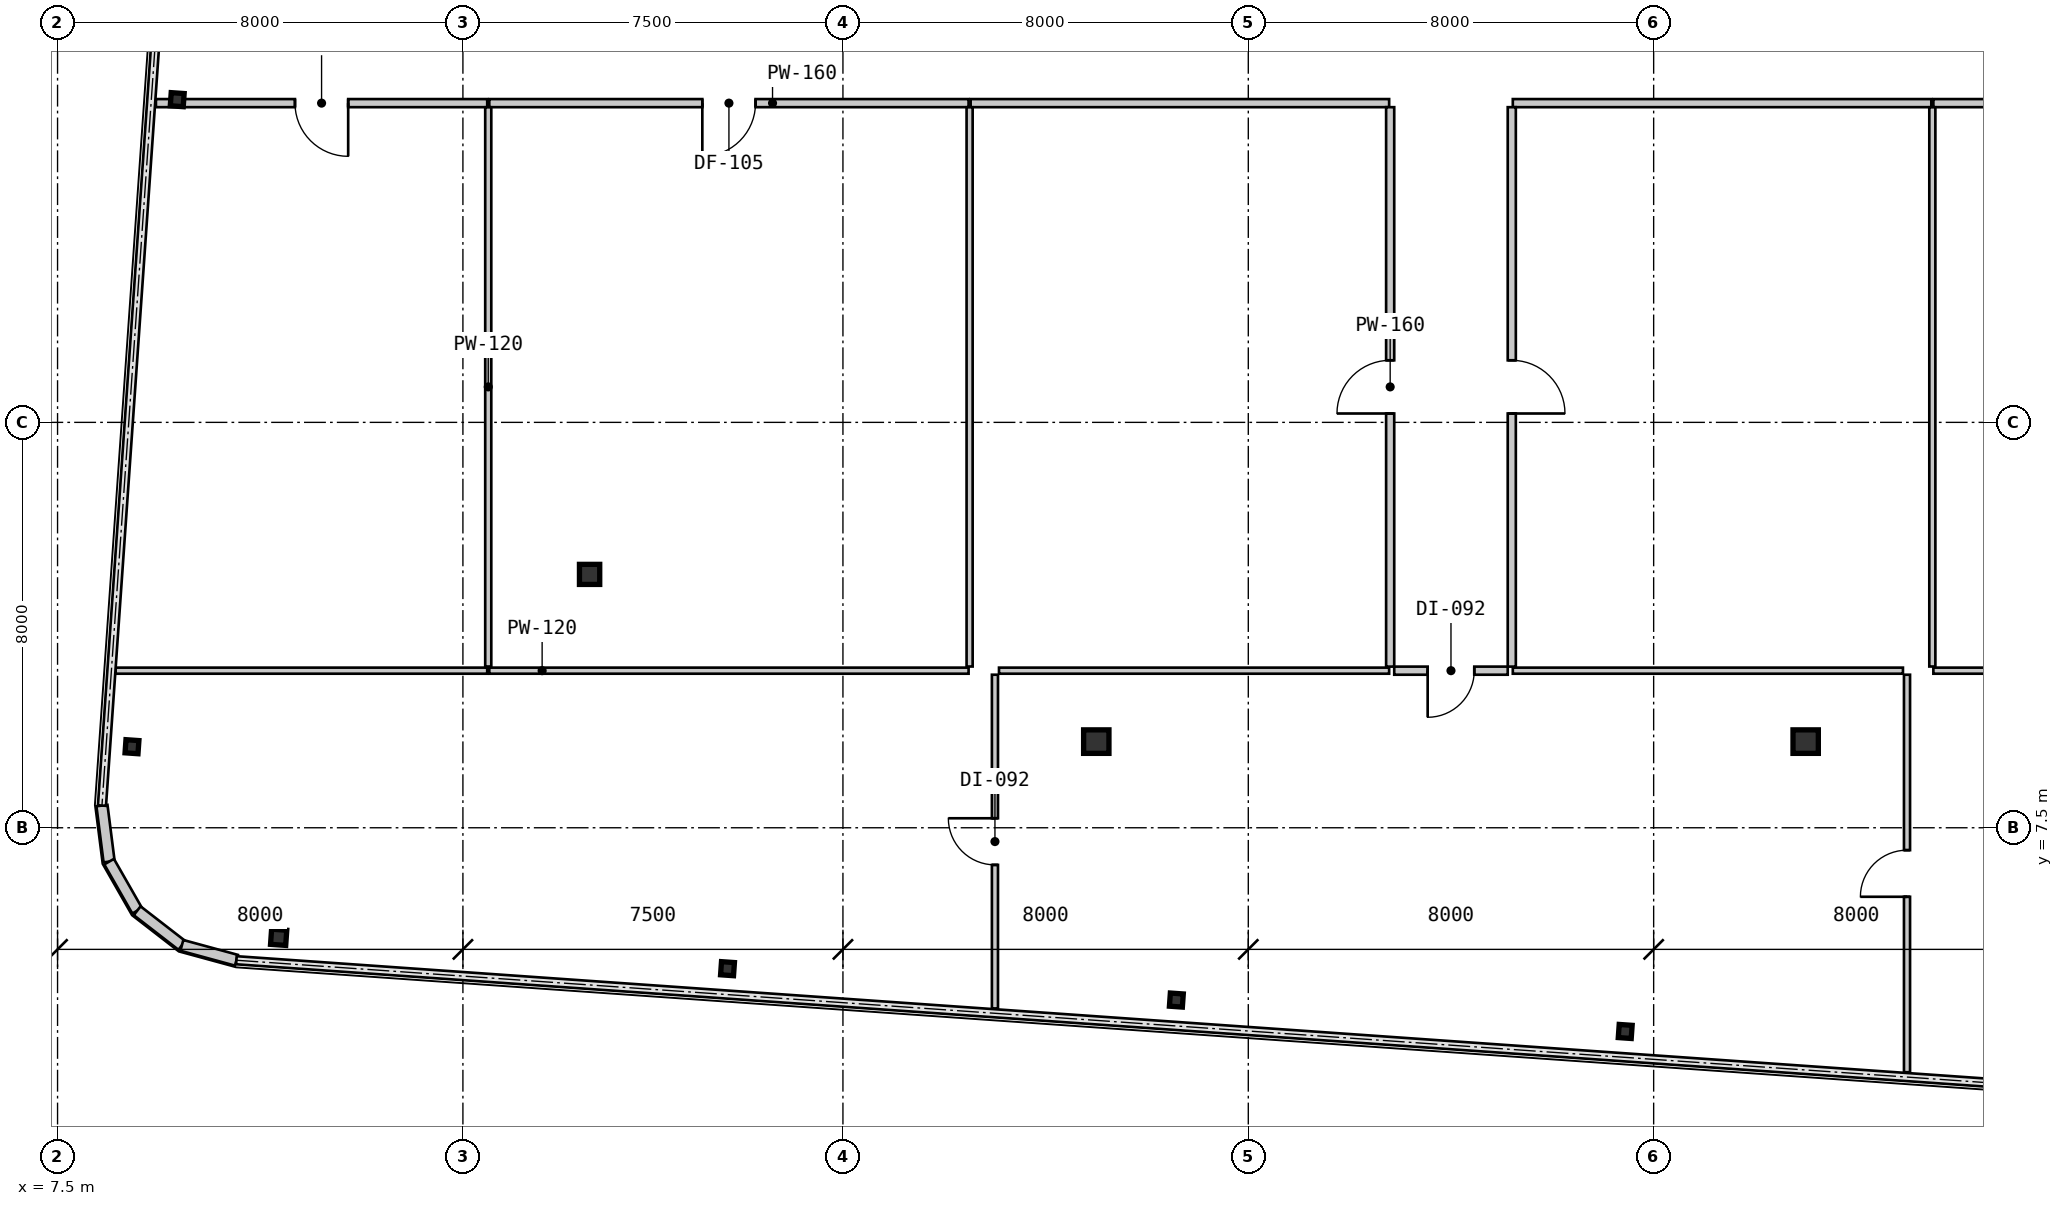
"""IFC4 building model, lengths in metres.
Left out: names, types, materials, properties, quantities, classifications, styles, units other than length and angle.
Written with IfcOpenShell. Run it as: python <this file> out.ifc"""

import sys

from ifc_helpers import new_model, si_unit, direction, frame, frame_2d, origin, origin_2d, place, context, subcontext, project, spatial, rectangle, hollow_rectangle, i_section, extrude, source, transform, mapped, element, fill, save


model = new_model("IFC4")
c1 = context("Model", 3, precision=1e-05, world=origin(), true_north=direction((0.0, 1.0)))
c2 = subcontext(c1, "Body", "Model", "MODEL_VIEW")
j1 = project(units=[si_unit("LENGTHUNIT", "METRE"), si_unit("PLANEANGLEUNIT", "RADIAN")], contexts=[c1])
p1 = place(None, origin())
s1 = spatial("IfcSite", under=j1, at=p1, CompositionType="ELEMENT")
p2 = place(p1, origin())
s2 = spatial("IfcBuilding", under=s1, at=p2, CompositionType="ELEMENT")
p3 = place(p2, frame((0.0, 0.0, 126.7)))
s3 = spatial("IfcBuildingStorey", under=s2, at=p3, CompositionType="ELEMENT", Elevation=126.7)
m1 = source(origin(), c2, "Body", "SweptSolid", [
    extrude(i_section(OverallWidth=0.5, OverallDepth=0.464, WebThickness=0.022, FlangeThickness=0.034, at=origin_2d()), origin(), (0.0, 0.0, 1.0), 3.15),
])
for number, where, z_axis, x_axis in (
    (1, (28.0, 9.2, 0.0), (0.0, 0.0, 1.0), (1.0, 0.0, 0.0)),
    (2, (42.0, 9.2, 0.0), (0.0, 0.0, 1.0), (1.0, 0.0, 0.0)),
):
    element("IfcColumn", number, at=place(p3, frame(where, z_axis=z_axis, x_axis=x_axis)), inside=s3, PredefinedType="COLUMN", context=c2, shape_type="MappedRepresentation", body=[
        mapped(m1, transform((0.0, 0.0, 0.0), scale=1.0)),
    ])
m2 = source(origin(), c2, "Body", "SweptSolid", [
    extrude(i_section(OverallWidth=0.4, OverallDepth=0.396, WebThickness=0.022, FlangeThickness=0.034, at=origin_2d()), origin(), (0.0, 0.0, 1.0), 3.15),
])
p4 = place(p3, frame((18.0, 12.5, 0.0), z_axis=(0.0, 0.0, 1.0), x_axis=(1.0, 0.0, 0.0)))
e3 = element("IfcColumn", 3, at=p4, inside=s3, PredefinedType="COLUMN", context=c2, shape_type="MappedRepresentation", body=[
    mapped(m2, transform((0.0, 0.0, 0.0), scale=1.0)),
])
m3 = source(origin(), c2, "Body", "SweptSolid", [
    extrude(hollow_rectangle(XDim=0.3, YDim=0.3, WallThickness=0.012, at=origin_2d()), origin(), (0.0, 0.0, 1.0), 3.15),
])
p5 = place(p3, frame((11.864, 5.338, 0.0), z_axis=(0.0, 0.0, 1.0), x_axis=(0.99756405026, -0.069756473744, 0.0)))
e4 = element("IfcColumn", 4, at=p5, inside=s3, PredefinedType="COLUMN", context=c2, shape_type="MappedRepresentation", body=[
    mapped(m3, transform((0.0, 0.0, 0.0), scale=1.0)),
])
m4 = source(origin(), c2, "Body", "SweptSolid", [
    extrude(i_section(OverallWidth=0.256, OverallDepth=0.26, WebThickness=0.01, FlangeThickness=0.017, at=origin_2d()), origin(), (0.0, 0.0, 1.0), 3.15),
])
for number, where, z_axis, x_axis in (
    (5, (20.722, 4.719, 0.0), (0.0, 0.0, 1.0), (0.998, -0.07, 0.0)),
    (6, (29.58, 4.1, 0.0), (0.0, 0.0, 1.0), (0.998, -0.07, 0.0)),
    (7, (38.439, 3.48, 0.0), (0.0, 0.0, 1.0), (0.998, -0.07, 0.0)),
    (8, (8.969, 9.1, 0.0), (0.0, 0.0, 1.0), (0.998, -0.07, 0.0)),
    (9, (9.862, 21.868, 0.0), (0.0, 0.0, 1.0), (0.998, -0.07, 0.0)),
):
    element("IfcColumn", number, at=place(p3, frame(where, z_axis=z_axis, x_axis=x_axis)), inside=s3, PredefinedType="COLUMN", context=c2, shape_type="MappedRepresentation", body=[
        mapped(m4, transform((0.0, 0.0, 0.0), scale=1.0)),
    ])
m5 = source(origin(), c2, "Body", "SweptSolid", [
    extrude(rectangle(XDim=1.116, YDim=0.22, at=frame_2d((0.558, 0.0))), origin(), (0.0, 0.0, 1.0), 2.93),
])
for number, where, z_axis, x_axis in (
    (10, (8.376, 7.938, 0.0), (0.0, 0.0, 1.0), (0.126, -0.992, 0.0)),
    (11, (8.517, 6.831, 0.0), (0.0, 0.0, 1.0), (0.496, -0.868, 0.0)),
    (12, (9.071, 5.862, 0.0), (0.0, 0.0, 1.0), (0.791, -0.612, 0.0)),
    (13, (9.953, 5.179, 0.0), (0.0, 0.0, 1.0), (0.965, -0.263, 0.0)),
):
    element("IfcWall", number, at=place(p3, frame(where, z_axis=z_axis, x_axis=x_axis)), inside=s3, PredefinedType="SOLIDWALL", context=c2, shape_type="MappedRepresentation", body=[
        mapped(m5, transform((0.0, 0.0, 0.0), scale=1.0)),
    ])
m6 = source(origin(), c2, "Body", "SweptSolid", [
    extrude(rectangle(XDim=6.538, YDim=0.16, at=frame_2d((3.269, 0.0))), origin(), (0.0, 0.0, 1.0), 2.93),
])
p6 = place(p3, frame((15.98, 21.8, 0.0), z_axis=(0.0, 0.0, 1.0), x_axis=(-1.0, 0.0, 0.0)))
e14 = element("IfcWall", 14, at=p6, inside=s3, PredefinedType="PARTITIONING", context=c2, shape_type="MappedRepresentation", body=[
    mapped(m6, transform((0.0, 0.0, 0.0), scale=1.0)),
])
m7 = source(origin(), c2, "Body", "SweptSolid", [
    extrude(rectangle(XDim=1.05, YDim=2.1, at=frame_2d((0.525, 1.05))), frame((0.0, 0.09, 0.0), z_axis=(0.0, -1.0, 0.0), x_axis=(1.0, 0.0, 0.0)), (0.0, 0.0, 1.0), 0.18),
])
p7 = place(p6, frame((2.744, 0.0, 0.0)))
e15 = element("IfcOpeningElement", 15, at=p7, cuts=e14, PredefinedType="OPENING", context=c2, shape_type="MappedRepresentation", body=[
    mapped(m7, transform((0.0, 0.0, 0.0), scale=1.0)),
])
m8 = source(origin(), c2, "Body", "SweptSolid", [
    extrude(rectangle(XDim=9.459, YDim=0.16, at=frame_2d((4.73, 0.0))), origin(), (0.0, 0.0, 1.0), 2.93),
])
p8 = place(p3, frame((25.48, 21.8, 0.0), z_axis=(0.0, 0.0, 1.0), x_axis=(-1.0, 0.0, 0.0)))
e16 = element("IfcWall", 16, at=p8, inside=s3, PredefinedType="PARTITIONING", context=c2, shape_type="MappedRepresentation", body=[
    mapped(m8, transform((0.0, 0.0, 0.0), scale=1.0)),
])
p9 = place(p8, frame((4.205, 0.0, 0.0)))
e17 = element("IfcOpeningElement", 17, at=p9, cuts=e16, PredefinedType="OPENING", context=c2, shape_type="MappedRepresentation", body=[
    mapped(m7, transform((0.0, 0.0, 0.0), scale=1.0)),
])
m9 = source(origin(), c2, "Body", "SweptSolid", [
    extrude(rectangle(XDim=8.26, YDim=0.16, at=frame_2d((4.13, 0.0))), origin(), (0.0, 0.0, 1.0), 2.93),
])
for number, where, z_axis, x_axis in (
    (18, (33.78, 21.8, 0.0), (0.0, 0.0, 1.0), (-1.0, 0.0, 0.0)),
    (19, (44.48, 21.8, 0.0), (0.0, 0.0, 1.0), (-1.0, 0.0, 0.0)),
):
    element("IfcWall", number, at=place(p3, frame(where, z_axis=z_axis, x_axis=x_axis)), inside=s3, PredefinedType="PARTITIONING", context=c2, shape_type="MappedRepresentation", body=[
        mapped(m9, transform((0.0, 0.0, 0.0), scale=1.0)),
    ])
p10 = place(p3, frame((53.98, 21.8, 0.0), z_axis=(0.0, 0.0, 1.0), x_axis=(-1.0, 0.0, 0.0)))
e20 = element("IfcWall", 20, at=p10, inside=s3, PredefinedType="PARTITIONING", context=c2, shape_type="MappedRepresentation", body=[
    mapped(m8, transform((0.0, 0.0, 0.0), scale=1.0)),
])
p11 = place(p10, frame((4.205, 0.0, 0.0)))
e21 = element("IfcOpeningElement", 21, at=p11, cuts=e20, PredefinedType="OPENING", context=c2, shape_type="MappedRepresentation", body=[
    mapped(m7, transform((0.0, 0.0, 0.0), scale=1.0)),
])
m10 = source(origin(), c2, "Body", "SweptSolid", [
    extrude(rectangle(XDim=2.24, YDim=0.16, at=frame_2d((1.12, 0.0))), origin(), (0.0, 0.0, 1.0), 2.93),
])
p12 = place(p3, frame((36.12, 10.6, 0.0), z_axis=(0.0, 0.0, 1.0), x_axis=(-1.0, 0.0, 0.0)))
e22 = element("IfcWall", 22, at=p12, inside=s3, PredefinedType="PARTITIONING", context=c2, shape_type="MappedRepresentation", body=[
    mapped(m10, transform((0.0, 0.0, 0.0), scale=1.0)),
])
m11 = source(origin(), c2, "Body", "SweptSolid", [
    extrude(rectangle(XDim=0.92, YDim=2.1, at=frame_2d((0.46, 1.05))), frame((0.0, 0.09, 0.0), z_axis=(0.0, -1.0, 0.0), x_axis=(1.0, 0.0, 0.0)), (0.0, 0.0, 1.0), 0.18),
])
p13 = place(p12, frame((0.66, 0.0, 0.0)))
e23 = element("IfcOpeningElement", 23, at=p13, cuts=e22, PredefinedType="OPENING", context=c2, shape_type="MappedRepresentation", body=[
    mapped(m11, transform((0.0, 0.0, 0.0), scale=1.0)),
])
m12 = source(origin(), c2, "Body", "SweptSolid", [
    extrude(rectangle(XDim=11.04, YDim=0.16, at=frame_2d((5.52, 0.0))), origin(), (0.0, 0.0, 1.0), 2.93),
])
p14 = place(p3, frame((33.8, 10.68, 0.0), z_axis=(0.0, 0.0, 1.0), x_axis=(0.0, 1.0, 0.0)))
e24 = element("IfcWall", 24, at=p14, inside=s3, PredefinedType="PARTITIONING", context=c2, shape_type="MappedRepresentation", body=[
    mapped(m12, transform((0.0, 0.0, 0.0), scale=1.0)),
])
p15 = place(p14, frame((4.995, 0.0, 0.0)))
e25 = element("IfcOpeningElement", 25, at=p15, cuts=e24, PredefinedType="OPENING", context=c2, shape_type="MappedRepresentation", body=[
    mapped(m7, transform((0.0, 0.0, 0.0), scale=1.0)),
])
p16 = place(p3, frame((36.2, 21.72, 0.0), z_axis=(0.0, 0.0, 1.0), x_axis=(0.0, -1.0, 0.0)))
e26 = element("IfcWall", 26, at=p16, inside=s3, PredefinedType="PARTITIONING", context=c2, shape_type="MappedRepresentation", body=[
    mapped(m12, transform((0.0, 0.0, 0.0), scale=1.0)),
])
p17 = place(p16, frame((4.995, 0.0, 0.0)))
e27 = element("IfcOpeningElement", 27, at=p17, cuts=e26, PredefinedType="OPENING", context=c2, shape_type="MappedRepresentation", body=[
    mapped(m7, transform((0.0, 0.0, 0.0), scale=1.0)),
])
m13 = source(origin(), c2, "Body", "SweptSolid", [
    extrude(rectangle(XDim=6.585, YDim=0.12, at=frame_2d((3.293, 0.0))), origin(), (0.0, 0.0, 1.0), 2.93),
])
p18 = place(p3, frame((26.0, 10.52, 0.0), z_axis=(0.0, 0.0, 1.0), x_axis=(0.0, -1.0, 0.0)))
e28 = element("IfcWall", 28, at=p18, inside=s3, PredefinedType="PARTITIONING", context=c2, shape_type="MappedRepresentation", body=[
    mapped(m13, transform((0.0, 0.0, 0.0), scale=1.0)),
])
m14 = source(origin(), c2, "Body", "SweptSolid", [
    extrude(rectangle(XDim=0.92, YDim=2.1, at=frame_2d((0.46, 1.05))), frame((0.0, 0.07, 0.0), z_axis=(0.0, -1.0, 0.0), x_axis=(1.0, 0.0, 0.0)), (0.0, 0.0, 1.0), 0.14),
])
p19 = place(p18, frame((2.833, 0.0, 0.0)))
e29 = element("IfcOpeningElement", 29, at=p19, cuts=e28, PredefinedType="OPENING", context=c2, shape_type="MappedRepresentation", body=[
    mapped(m14, transform((0.0, 0.0, 0.0), scale=1.0)),
])
m15 = source(origin(), c2, "Body", "SweptSolid", [
    extrude(rectangle(XDim=7.333, YDim=0.12, at=frame_2d((3.666, 0.0))), origin(), (0.0, 0.0, 1.0), 2.93),
])
p20 = place(p3, frame((8.647, 10.6, 0.0), z_axis=(0.0, 0.0, 1.0), x_axis=(1.0, 0.0, 0.0)))
e30 = element("IfcWall", 30, at=p20, inside=s3, PredefinedType="PARTITIONING", context=c2, shape_type="MappedRepresentation", body=[
    mapped(m15, transform((0.0, 0.0, 0.0), scale=1.0)),
])
m16 = source(origin(), c2, "Body", "SweptSolid", [
    extrude(rectangle(XDim=9.459, YDim=0.12, at=frame_2d((4.73, 0.0))), origin(), (0.0, 0.0, 1.0), 2.93),
])
p21 = place(p3, frame((16.02, 10.6, 0.0), z_axis=(0.0, 0.0, 1.0), x_axis=(1.0, 0.0, 0.0)))
e31 = element("IfcWall", 31, at=p21, inside=s3, PredefinedType="PARTITIONING", context=c2, shape_type="MappedRepresentation", body=[
    mapped(m16, transform((0.0, 0.0, 0.0), scale=1.0)),
])
m17 = source(origin(), c2, "Body", "SweptSolid", [
    extrude(rectangle(XDim=7.844, YDim=0.12, at=frame_2d((3.922, 0.0))), origin(), (0.0, 0.0, 1.0), 2.93),
])
p22 = place(p3, frame((44.0, 10.52, 0.0), z_axis=(0.0, 0.0, 1.0), x_axis=(0.0, -1.0, 0.0)))
e32 = element("IfcWall", 32, at=p22, inside=s3, PredefinedType="PARTITIONING", context=c2, shape_type="MappedRepresentation", body=[
    mapped(m17, transform((0.0, 0.0, 0.0), scale=1.0)),
])
p23 = place(p22, frame((3.462, 0.0, 0.0)))
e33 = element("IfcOpeningElement", 33, at=p23, cuts=e32, PredefinedType="OPENING", context=c2, shape_type="MappedRepresentation", body=[
    mapped(m14, transform((0.0, 0.0, 0.0), scale=1.0)),
])
m18 = source(origin(), c2, "Body", "SweptSolid", [
    extrude(rectangle(XDim=7.7, YDim=0.12, at=frame_2d((3.85, 0.0))), origin(), (0.0, 0.0, 1.0), 2.93),
])
for number, where, z_axis, x_axis in (
    (34, (26.08, 10.6, 0.0), (0.0, 0.0, 1.0), (1.0, 0.0, 0.0)),
    (35, (36.22, 10.6, 0.0), (0.0, 0.0, 1.0), (1.0, 0.0, 0.0)),
):
    element("IfcWall", number, at=place(p3, frame(where, z_axis=z_axis, x_axis=x_axis)), inside=s3, PredefinedType="PARTITIONING", context=c2, shape_type="MappedRepresentation", body=[
        mapped(m18, transform((0.0, 0.0, 0.0), scale=1.0)),
    ])
p24 = place(p3, frame((44.52, 10.6, 0.0), z_axis=(0.0, 0.0, 1.0), x_axis=(1.0, 0.0, 0.0)))
e36 = element("IfcWall", 36, at=p24, inside=s3, PredefinedType="PARTITIONING", context=c2, shape_type="MappedRepresentation", body=[
    mapped(m16, transform((0.0, 0.0, 0.0), scale=1.0)),
])
m19 = source(origin(), c2, "Body", "SweptSolid", [
    extrude(rectangle(XDim=11.036, YDim=0.12, at=frame_2d((5.518, 0.0))), origin(), (0.0, 0.0, 1.0), 2.93),
])
for number, where, z_axis, x_axis in (
    (37, (16.0, 21.718, 0.0), (0.0, 0.0, 1.0), (0.0, -1.0, 0.0)),
    (38, (25.5, 21.718, 0.0), (0.0, 0.0, 1.0), (0.0, -1.0, 0.0)),
    (39, (44.5, 21.718, 0.0), (0.0, 0.0, 1.0), (0.0, -1.0, 0.0)),
):
    element("IfcWall", number, at=place(p3, frame(where, z_axis=z_axis, x_axis=x_axis)), inside=s3, PredefinedType="PARTITIONING", context=c2, shape_type="MappedRepresentation", body=[
        mapped(m19, transform((0.0, 0.0, 0.0), scale=1.0)),
    ])
m20 = source(origin(), c2, "Body", "SweptSolid", [
    extrude(rectangle(XDim=1.05, YDim=2.1, at=frame_2d((0.525, 1.05))), frame((0.0, 0.025, 0.0), z_axis=(0.0, -1.0, 0.0), x_axis=(1.0, 0.0, 0.0)), (0.0, 0.0, 1.0), 0.05),
])
p25 = place(p7, origin())
e40 = element("IfcDoor", 40, at=p25, inside=s3, OperationType="SINGLE_SWING_LEFT", PredefinedType="DOOR", context=c2, shape_type="MappedRepresentation", body=[
    mapped(m20, transform((0.0, 0.0, 0.0), scale=1.0)),
])
fill(e15, e40)
p26 = place(p9, origin())
e41 = element("IfcDoor", 41, at=p26, inside=s3, OperationType="SINGLE_SWING_RIGHT", PredefinedType="DOOR", context=c2, shape_type="MappedRepresentation", body=[
    mapped(m20, transform((0.0, 0.0, 0.0), scale=1.0)),
])
fill(e17, e41)
m21 = source(origin(), c2, "Body", "SweptSolid", [
    extrude(rectangle(XDim=0.92, YDim=2.1, at=frame_2d((0.46, 1.05))), frame((0.0, 0.025, 0.0), z_axis=(0.0, -1.0, 0.0), x_axis=(1.0, 0.0, 0.0)), (0.0, 0.0, 1.0), 0.05),
])
p27 = place(p13, origin())
e42 = element("IfcDoor", 42, at=p27, inside=s3, OperationType="SINGLE_SWING_RIGHT", PredefinedType="DOOR", context=c2, shape_type="MappedRepresentation", body=[
    mapped(m21, transform((0.0, 0.0, 0.0), scale=1.0)),
])
fill(e23, e42)
p28 = place(p15, origin())
e43 = element("IfcDoor", 43, at=p28, inside=s3, OperationType="SINGLE_SWING_LEFT", PredefinedType="DOOR", context=c2, shape_type="MappedRepresentation", body=[
    mapped(m20, transform((0.0, 0.0, 0.0), scale=1.0)),
])
fill(e25, e43)
p29 = place(p17, origin())
e44 = element("IfcDoor", 44, at=p29, inside=s3, OperationType="SINGLE_SWING_RIGHT", PredefinedType="DOOR", context=c2, shape_type="MappedRepresentation", body=[
    mapped(m20, transform((0.0, 0.0, 0.0), scale=1.0)),
])
fill(e27, e44)
p30 = place(p19, frame((0.92, 0.0, 0.0), z_axis=(0.0, 0.0, 1.0), x_axis=(-1.0, 0.0, 0.0)))
e45 = element("IfcDoor", 45, at=p30, inside=s3, OperationType="SINGLE_SWING_RIGHT", PredefinedType="DOOR", context=c2, shape_type="MappedRepresentation", body=[
    mapped(m21, transform((0.0, 0.0, 0.0), scale=1.0)),
])
fill(e29, e45)
p31 = place(p23, frame((0.92, 0.0, 0.0), z_axis=(0.0, 0.0, 1.0), x_axis=(-1.0, 0.0, 0.0)))
e46 = element("IfcDoor", 46, at=p31, inside=s3, OperationType="SINGLE_SWING_LEFT", PredefinedType="DOOR", context=c2, shape_type="MappedRepresentation", body=[
    mapped(m21, transform((0.0, 0.0, 0.0), scale=1.0)),
])
fill(e33, e46)
save(model, sys.argv[1])
